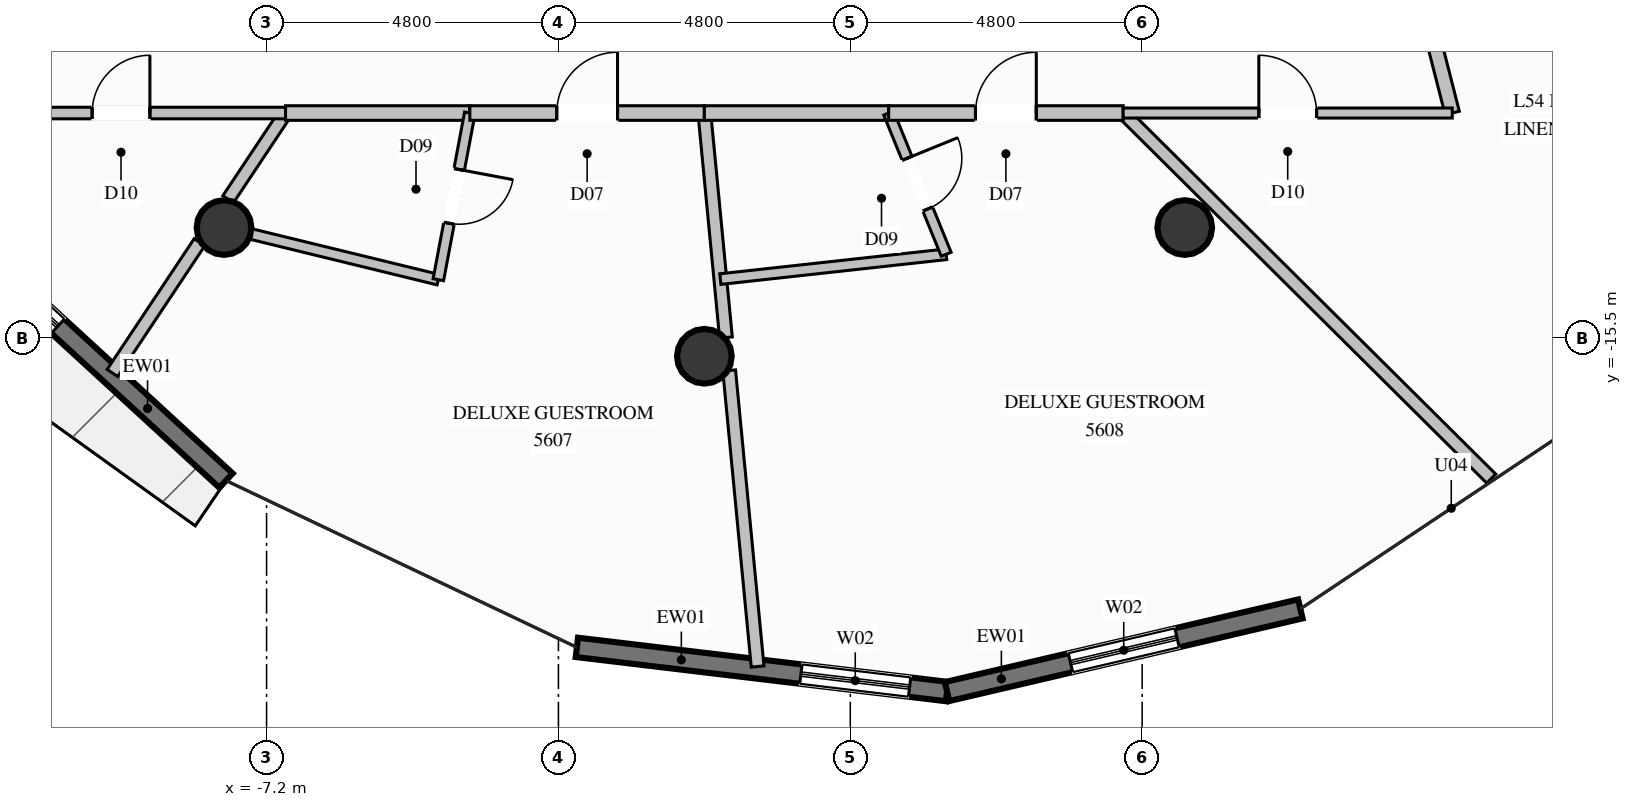
"""IFC4 building model, lengths in metres.
Left out: names, types, materials, properties, quantities, classifications, styles, units other than length and angle.
Written with IfcOpenShell. Run it as: python <this file> out.ifc"""

import sys

from ifc_helpers import new_model, si_unit, direction, frame, frame_2d, origin, origin_2d, place, context, subcontext, project, spatial, rectangle, circle, extrude, element, fill, save


model = new_model("IFC4")
c1 = context("Model", 3, precision=1e-05, world=origin(), true_north=direction((0.0, 1.0)))
c2 = subcontext(c1, "Body", "Model", "MODEL_VIEW")
j1 = project(units=[si_unit("LENGTHUNIT", "METRE"), si_unit("PLANEANGLEUNIT", "RADIAN")], contexts=[c1])
p1 = place(None, origin())
s1 = spatial("IfcSite", under=j1, at=p1, CompositionType="ELEMENT")
p2 = place(p1, origin())
s2 = spatial("IfcBuilding", under=s1, at=p2, CompositionType="ELEMENT")
p3 = place(p2, frame((0.0, 0.0, 209.2)))
s3 = spatial("IfcBuildingStorey", under=s2, at=p3, CompositionType="ELEMENT", Elevation=209.2)
for number, where, z_axis, x_axis in (
    (1, (-7.9, -13.683, 0.0), (0.0, 0.0, 1.0), (1.0, 0.0, 0.0)),
    (2, (0.0, -15.8, 0.0), (0.0, 0.0, 1.0), (1.0, 0.0, 0.0)),
    (3, (7.9, -13.683, 0.0), (0.0, 0.0, 1.0), (1.0, 0.0, 0.0)),
):
    element("IfcColumn", number, at=place(p3, frame(where, z_axis=z_axis, x_axis=x_axis)), inside=s3, PredefinedType="COLUMN", context=c2, shape_type="SweptSolid", body=[
        extrude(circle(Radius=0.45, at=origin_2d()), origin(), (0.0, 0.0, 1.0), 3.6),
    ])
p4 = place(p3, frame((-7.867, -17.844, 0.0), z_axis=(0.0, 0.0, 1.0), x_axis=(-0.736523155924, 0.676412330452, 0.0)))
e4 = element("IfcWall", 4, at=p4, inside=s3, PredefinedType="SOLIDWALL", context=c2, shape_type="SweptSolid", body=[
    extrude(rectangle(XDim=6.636, YDim=0.32, at=frame_2d((3.318, 0.0))), origin(), (0.0, 0.0, 1.0), 3.36),
])
p5 = place(p4, frame((3.754, 0.0, 0.35)))
e5 = element("IfcOpeningElement", 5, at=p5, cuts=e4, PredefinedType="OPENING", context=c2, shape_type="SweptSolid", body=[
    extrude(rectangle(XDim=1.8, YDim=2.6, at=frame_2d((0.9, 1.3))), frame((0.0, 0.17, 0.0), z_axis=(0.0, -1.0, 0.0), x_axis=(1.0, 0.0, 0.0)), (0.0, 0.0, 1.0), 0.34),
])
p6 = place(p3, frame((3.992, -21.314, 0.0), z_axis=(0.0, 0.0, 1.0), x_axis=(-0.99294637343, 0.118564326386, 0.0)))
e6 = element("IfcWall", 6, at=p6, inside=s3, PredefinedType="SOLIDWALL", context=c2, shape_type="SweptSolid", body=[
    extrude(rectangle(XDim=6.132, YDim=0.32, at=frame_2d((3.066, 0.0))), origin(), (0.0, 0.0, 1.0), 3.36),
])
p7 = place(p6, frame((0.621, 0.0, 0.35)))
e7 = element("IfcOpeningElement", 7, at=p7, cuts=e6, PredefinedType="OPENING", context=c2, shape_type="SweptSolid", body=[
    extrude(rectangle(XDim=1.8, YDim=2.6, at=frame_2d((0.9, 1.3))), frame((0.0, 0.17, 0.0), z_axis=(0.0, -1.0, 0.0), x_axis=(1.0, 0.0, 0.0)), (0.0, 0.0, 1.0), 0.34),
])
p8 = place(p3, frame((9.802, -19.955, 0.0), z_axis=(0.0, 0.0, 1.0), x_axis=(-0.97372216523, -0.227739203785, 0.0)))
e8 = element("IfcWall", 8, at=p8, inside=s3, PredefinedType="SOLIDWALL", context=c2, shape_type="SweptSolid", body=[
    extrude(rectangle(XDim=5.967, YDim=0.32, at=frame_2d((2.983, 0.0))), origin(), (0.0, 0.0, 1.0), 3.36),
])
p9 = place(p8, frame((2.083, 0.0, 0.35)))
e9 = element("IfcOpeningElement", 9, at=p9, cuts=e8, PredefinedType="OPENING", context=c2, shape_type="SweptSolid", body=[
    extrude(rectangle(XDim=1.8, YDim=2.6, at=frame_2d((0.9, 1.3))), frame((0.0, 0.17, 0.0), z_axis=(0.0, -1.0, 0.0), x_axis=(1.0, 0.0, 0.0)), (0.0, 0.0, 1.0), 0.34),
])
p10 = place(p3, frame((-6.888, -11.8, 0.0), z_axis=(0.0, 0.0, 1.0), x_axis=(-0.55420400286, -0.83238087629, 0.0)))
e10 = element("IfcWall", 10, at=p10, inside=s3, PredefinedType="PARTITIONING", context=c2, shape_type="SweptSolid", body=[
    extrude(rectangle(XDim=1.704, YDim=0.21, at=frame_2d((0.852, 0.0))), origin(), (0.0, 0.0, 1.0), 2.801),
])
p11 = place(p3, frame((-8.303, -13.925, 0.0), z_axis=(0.0, 0.0, 1.0), x_axis=(-0.554394819338, -0.832253798004, 0.0)))
e11 = element("IfcWall", 11, at=p11, inside=s3, PredefinedType="PARTITIONING", context=c2, shape_type="SweptSolid", body=[
    extrude(rectangle(XDim=2.583, YDim=0.21, at=frame_2d((1.292, 0.0))), origin(), (0.0, 0.0, 1.0), 3.36),
])
p12 = place(p3, frame((-12.3, -11.8, 0.0), z_axis=(0.0, 0.0, 1.0), x_axis=(1.0, 0.0, 0.0)))
e12 = element("IfcWall", 12, at=p12, inside=s3, PredefinedType="PARTITIONING", context=c2, shape_type="SweptSolid", body=[
    extrude(rectangle(XDim=5.412, YDim=0.19, at=frame_2d((2.706, 0.0))), origin(), (0.0, 0.0, 1.0), 3.36),
])
p13 = place(p12, frame((2.231, 0.0, 0.0)))
e13 = element("IfcOpeningElement", 13, at=p13, cuts=e12, PredefinedType="OPENING", context=c2, shape_type="SweptSolid", body=[
    extrude(rectangle(XDim=0.95, YDim=2.1, at=frame_2d((0.475, 1.05))), frame((0.0, 0.105, 0.0), z_axis=(0.0, -1.0, 0.0), x_axis=(1.0, 0.0, 0.0)), (0.0, 0.0, 1.0), 0.21),
])
p14 = place(p3, frame((-6.888, -11.8, 0.0), z_axis=(0.0, 0.0, 1.0), x_axis=(1.0, 0.0, 0.0)))
e14 = element("IfcWall", 14, at=p14, inside=s3, PredefinedType="PARTITIONING", context=c2, shape_type="SweptSolid", body=[
    extrude(rectangle(XDim=3.031, YDim=0.24, at=frame_2d((1.516, 0.0))), origin(), (0.0, 0.0, 1.0), 3.36),
])
p15 = place(p3, frame((-8.107, -13.631, 0.0), z_axis=(0.0, 0.0, 1.0), x_axis=(0.971539249473, -0.236878632918, 0.0)))
e15 = element("IfcWall", 15, at=p15, inside=s3, PredefinedType="PLUMBINGWALL", context=c2, shape_type="SweptSolid", body=[
    extrude(rectangle(XDim=3.841, YDim=0.175, at=frame_2d((1.921, 0.0))), origin(), (0.0, 0.0, 1.0), 2.929),
])
p16 = place(p3, frame((-3.857, -11.8, 0.0), z_axis=(0.0, 0.0, 1.0), x_axis=(-0.185720387527, -0.982602634668, 0.0)))
e16 = element("IfcWall", 16, at=p16, inside=s3, PredefinedType="PLUMBINGWALL", context=c2, shape_type="SweptSolid", body=[
    extrude(rectangle(XDim=2.79, YDim=0.175, at=frame_2d((1.395, 0.0))), origin(), (0.0, 0.0, 1.0), 3.36),
])
p17 = place(p16, frame((0.945, 0.0, 0.0)))
e17 = element("IfcOpeningElement", 17, at=p17, cuts=e16, PredefinedType="OPENING", context=c2, shape_type="SweptSolid", body=[
    extrude(rectangle(XDim=0.9, YDim=2.1, at=frame_2d((0.45, 1.05))), frame((0.0, 0.098, 0.0), z_axis=(0.0, -1.0, 0.0), x_axis=(1.0, 0.0, 0.0)), (0.0, 0.0, 1.0), 0.195),
])
p18 = place(p3, frame((0.0, -11.8, 0.0), z_axis=(0.0, 0.0, 1.0), x_axis=(0.095709898097, -0.995409270304, 0.0)))
e18 = element("IfcWall", 18, at=p18, inside=s3, PredefinedType="PARTITIONING", context=c2, shape_type="SweptSolid", body=[
    extrude(rectangle(XDim=3.709, YDim=0.21, at=frame_2d((1.854, 0.0))), origin(), (0.0, 0.0, 1.0), 2.801),
])
p19 = place(p3, frame((0.408, -16.034, 0.0), z_axis=(0.0, 0.0, 1.0), x_axis=(0.095697187257, -0.995410492385, 0.0)))
e19 = element("IfcWall", 19, at=p19, inside=s3, PredefinedType="PARTITIONING", context=c2, shape_type="SweptSolid", body=[
    extrude(rectangle(XDim=4.891, YDim=0.21, at=frame_2d((2.445, 0.0))), origin(), (0.0, 0.0, 1.0), 3.36),
])
p20 = place(p3, frame((-3.857, -11.8, 0.0), z_axis=(0.0, 0.0, 1.0), x_axis=(1.0, 0.0, 0.0)))
e20 = element("IfcWall", 20, at=p20, inside=s3, PredefinedType="PARTITIONING", context=c2, shape_type="SweptSolid", body=[
    extrude(rectangle(XDim=3.857, YDim=0.24, at=frame_2d((1.928, 0.0))), origin(), (0.0, 0.0, 1.0), 3.36),
])
p21 = place(p20, frame((1.429, 0.0, 0.0)))
e21 = element("IfcOpeningElement", 21, at=p21, cuts=e20, PredefinedType="OPENING", context=c2, shape_type="SweptSolid", body=[
    extrude(rectangle(XDim=1.0, YDim=2.2, at=frame_2d((0.5, 1.1))), frame((0.0, 0.13, 0.0), z_axis=(0.0, -1.0, 0.0), x_axis=(1.0, 0.0, 0.0)), (0.0, 0.0, 1.0), 0.26),
])
p22 = place(p3, frame((0.0, -11.8, 0.0), z_axis=(0.0, 0.0, 1.0), x_axis=(1.0, 0.0, 0.0)))
e22 = element("IfcWall", 22, at=p22, inside=s3, PredefinedType="PARTITIONING", context=c2, shape_type="SweptSolid", body=[
    extrude(rectangle(XDim=3.031, YDim=0.24, at=frame_2d((1.516, 0.0))), origin(), (0.0, 0.0, 1.0), 3.36),
])
p23 = place(p3, frame((0.263, -14.531, 0.0), z_axis=(0.0, 0.0, 1.0), x_axis=(0.994021600206, 0.109183599155, 0.0)))
e23 = element("IfcWall", 23, at=p23, inside=s3, PredefinedType="PLUMBINGWALL", context=c2, shape_type="SweptSolid", body=[
    extrude(rectangle(XDim=3.736, YDim=0.175, at=frame_2d((1.868, 0.0))), origin(), (0.0, 0.0, 1.0), 2.929),
])
p24 = place(p3, frame((3.031, -11.8, 0.0), z_axis=(0.0, 0.0, 1.0), x_axis=(0.377173211215, -0.9261427367, 0.0)))
e24 = element("IfcWall", 24, at=p24, inside=s3, PredefinedType="PLUMBINGWALL", context=c2, shape_type="SweptSolid", body=[
    extrude(rectangle(XDim=2.508, YDim=0.175, at=frame_2d((1.254, 0.0))), origin(), (0.0, 0.0, 1.0), 3.36),
])
p25 = place(p24, frame((0.804, 0.0, 0.0)))
e25 = element("IfcOpeningElement", 25, at=p25, cuts=e24, PredefinedType="OPENING", context=c2, shape_type="SweptSolid", body=[
    extrude(rectangle(XDim=0.9, YDim=2.1, at=frame_2d((0.45, 1.05))), frame((0.0, 0.098, 0.0), z_axis=(0.0, -1.0, 0.0), x_axis=(1.0, 0.0, 0.0)), (0.0, 0.0, 1.0), 0.195),
])
p26 = place(p3, frame((6.888, -11.8, 0.0), z_axis=(0.0, 0.0, 1.0), x_axis=(0.709506540997, -0.704698849355, 0.0)))
e26 = element("IfcWall", 26, at=p26, inside=s3, PredefinedType="PARTITIONING", context=c2, shape_type="SweptSolid", body=[
    extrude(rectangle(XDim=8.531, YDim=0.21, at=frame_2d((4.266, 0.0))), origin(), (0.0, 0.0, 1.0), 3.36),
])
p27 = place(p3, frame((3.031, -11.8, 0.0), z_axis=(0.0, 0.0, 1.0), x_axis=(1.0, 0.0, 0.0)))
e27 = element("IfcWall", 27, at=p27, inside=s3, PredefinedType="PARTITIONING", context=c2, shape_type="SweptSolid", body=[
    extrude(rectangle(XDim=3.857, YDim=0.24, at=frame_2d((1.928, 0.0))), origin(), (0.0, 0.0, 1.0), 3.36),
])
p28 = place(p27, frame((1.428, 0.0, 0.0)))
e28 = element("IfcOpeningElement", 28, at=p28, cuts=e27, PredefinedType="OPENING", context=c2, shape_type="SweptSolid", body=[
    extrude(rectangle(XDim=1.0, YDim=2.2, at=frame_2d((0.5, 1.1))), frame((0.0, 0.13, 0.0), z_axis=(0.0, -1.0, 0.0), x_axis=(1.0, 0.0, 0.0)), (0.0, 0.0, 1.0), 0.26),
])
p29 = place(p3, frame((12.3, -11.8, 0.0), z_axis=(0.0, 0.0, 1.0), x_axis=(-0.247511976945, 0.968884833852, 0.0)))
e29 = element("IfcWall", 29, at=p29, inside=s3, PredefinedType="PARTITIONING", context=c2, shape_type="SweptSolid", body=[
    extrude(rectangle(XDim=5.341, YDim=0.24, at=frame_2d((2.671, 0.0))), origin(), (0.0, 0.0, 1.0), 3.36),
])
p30 = place(p3, frame((6.888, -11.8, 0.0), z_axis=(0.0, 0.0, 1.0), x_axis=(1.0, 0.0, 0.0)))
e30 = element("IfcWall", 30, at=p30, inside=s3, PredefinedType="PARTITIONING", context=c2, shape_type="SweptSolid", body=[
    extrude(rectangle(XDim=5.412, YDim=0.165, at=frame_2d((2.706, 0.0))), origin(), (0.0, 0.0, 1.0), 3.36),
])
p31 = place(p30, frame((2.231, 0.0, 0.0)))
e31 = element("IfcOpeningElement", 31, at=p31, cuts=e30, PredefinedType="OPENING", context=c2, shape_type="SweptSolid", body=[
    extrude(rectangle(XDim=0.95, YDim=2.1, at=frame_2d((0.475, 1.05))), frame((0.0, 0.093, 0.0), z_axis=(0.0, -1.0, 0.0), x_axis=(1.0, 0.0, 0.0)), (0.0, 0.0, 1.0), 0.185),
])
p32 = place(p5, origin())
e32 = element("IfcWindow", 32, at=p32, inside=s3, PartitioningType="SINGLE_PANEL", PredefinedType="WINDOW", context=c2, shape_type="SweptSolid", body=[
    extrude(rectangle(XDim=1.8, YDim=2.6, at=frame_2d((0.9, 1.3))), frame((0.0, 0.03, 0.0), z_axis=(0.0, -1.0, 0.0), x_axis=(1.0, 0.0, 0.0)), (0.0, 0.0, 1.0), 0.06),
])
fill(e5, e32)
p33 = place(p7, origin())
e33 = element("IfcWindow", 33, at=p33, inside=s3, PartitioningType="SINGLE_PANEL", PredefinedType="WINDOW", context=c2, shape_type="SweptSolid", body=[
    extrude(rectangle(XDim=1.8, YDim=2.6, at=frame_2d((0.9, 1.3))), frame((0.0, 0.03, 0.0), z_axis=(0.0, -1.0, 0.0), x_axis=(1.0, 0.0, 0.0)), (0.0, 0.0, 1.0), 0.06),
])
fill(e7, e33)
p34 = place(p9, origin())
e34 = element("IfcWindow", 34, at=p34, inside=s3, PartitioningType="SINGLE_PANEL", PredefinedType="WINDOW", context=c2, shape_type="SweptSolid", body=[
    extrude(rectangle(XDim=1.8, YDim=2.6, at=frame_2d((0.9, 1.3))), frame((0.0, 0.03, 0.0), z_axis=(0.0, -1.0, 0.0), x_axis=(1.0, 0.0, 0.0)), (0.0, 0.0, 1.0), 0.06),
])
fill(e9, e34)
p35 = place(p13, origin())
e35 = element("IfcDoor", 35, at=p35, inside=s3, OperationType="SINGLE_SWING_RIGHT", PredefinedType="DOOR", context=c2, shape_type="SweptSolid", body=[
    extrude(rectangle(XDim=0.95, YDim=2.1, at=frame_2d((0.475, 1.05))), frame((0.0, 0.025, 0.0), z_axis=(0.0, -1.0, 0.0), x_axis=(1.0, 0.0, 0.0)), (0.0, 0.0, 1.0), 0.05),
])
fill(e13, e35)
p36 = place(p17, origin())
e36 = element("IfcDoor", 36, at=p36, inside=s3, OperationType="SINGLE_SWING_LEFT", PredefinedType="DOOR", context=c2, shape_type="SweptSolid", body=[
    extrude(rectangle(XDim=0.9, YDim=2.1, at=frame_2d((0.45, 1.05))), frame((0.0, 0.025, 0.0), z_axis=(0.0, -1.0, 0.0), x_axis=(1.0, 0.0, 0.0)), (0.0, 0.0, 1.0), 0.05),
])
fill(e17, e36)
p37 = place(p21, origin())
e37 = element("IfcDoor", 37, at=p37, inside=s3, OperationType="SINGLE_SWING_RIGHT", PredefinedType="DOOR", context=c2, shape_type="SweptSolid", body=[
    extrude(rectangle(XDim=1.0, YDim=2.2, at=frame_2d((0.5, 1.1))), frame((0.0, 0.025, 0.0), z_axis=(0.0, -1.0, 0.0), x_axis=(1.0, 0.0, 0.0)), (0.0, 0.0, 1.0), 0.05),
])
fill(e21, e37)
p38 = place(p25, origin())
e38 = element("IfcDoor", 38, at=p38, inside=s3, OperationType="SINGLE_SWING_LEFT", PredefinedType="DOOR", context=c2, shape_type="SweptSolid", body=[
    extrude(rectangle(XDim=0.9, YDim=2.1, at=frame_2d((0.45, 1.05))), frame((0.0, 0.025, 0.0), z_axis=(0.0, -1.0, 0.0), x_axis=(1.0, 0.0, 0.0)), (0.0, 0.0, 1.0), 0.05),
])
fill(e25, e38)
p39 = place(p28, origin())
e39 = element("IfcDoor", 39, at=p39, inside=s3, OperationType="SINGLE_SWING_RIGHT", PredefinedType="DOOR", context=c2, shape_type="SweptSolid", body=[
    extrude(rectangle(XDim=1.0, YDim=2.2, at=frame_2d((0.5, 1.1))), frame((0.0, 0.025, 0.0), z_axis=(0.0, -1.0, 0.0), x_axis=(1.0, 0.0, 0.0)), (0.0, 0.0, 1.0), 0.05),
])
fill(e28, e39)
p40 = place(p31, origin())
e40 = element("IfcDoor", 40, at=p40, inside=s3, OperationType="SINGLE_SWING_LEFT", PredefinedType="DOOR", context=c2, shape_type="SweptSolid", body=[
    extrude(rectangle(XDim=0.95, YDim=2.1, at=frame_2d((0.475, 1.05))), frame((0.0, 0.025, 0.0), z_axis=(0.0, -1.0, 0.0), x_axis=(1.0, 0.0, 0.0)), (0.0, 0.0, 1.0), 0.05),
])
fill(e31, e40)
save(model, sys.argv[1])
